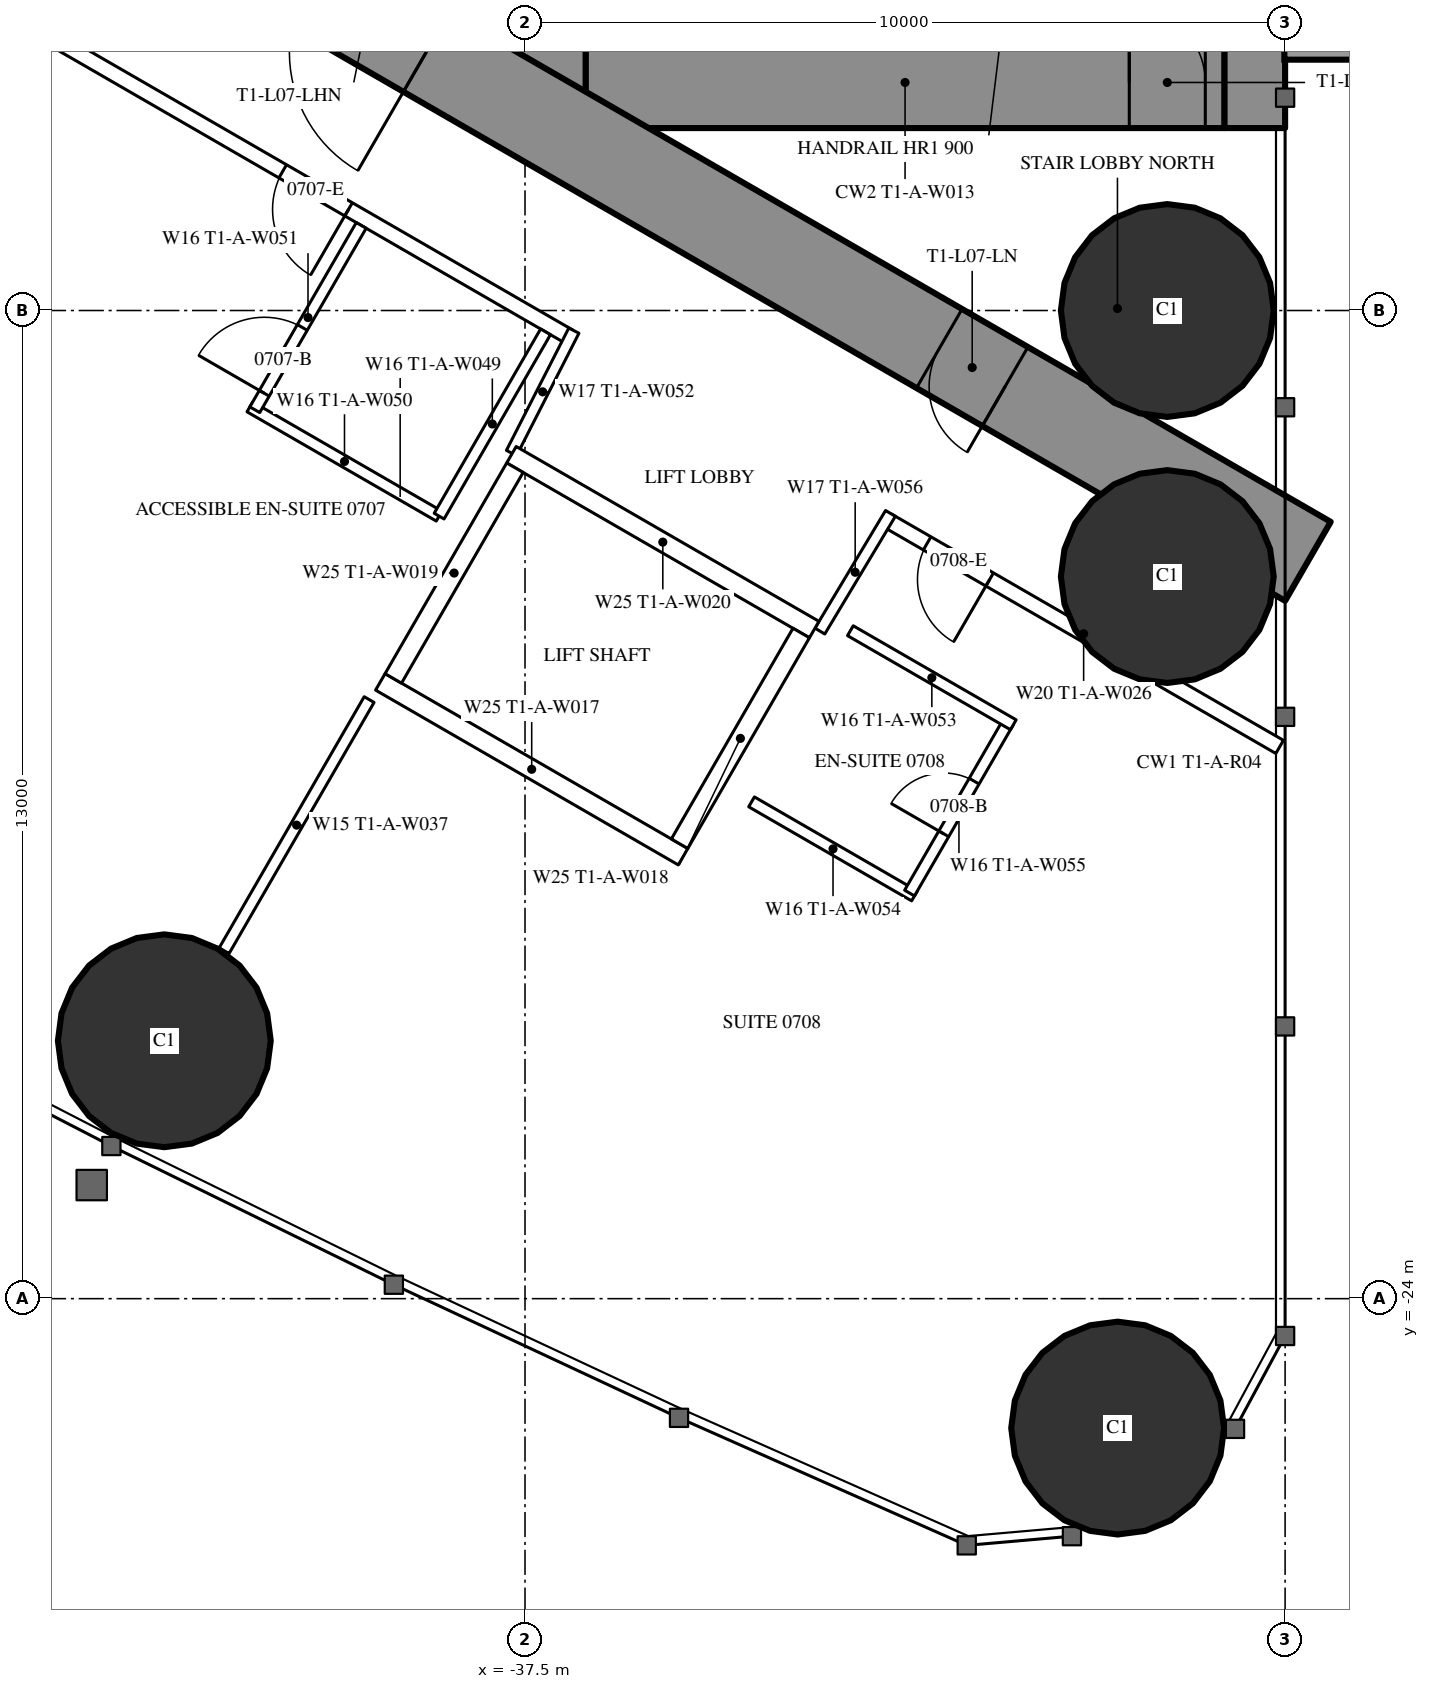
"""IFC4 building model, lengths in metres.
Left out: names, types, materials, properties, quantities, classifications, styles, units other than length and angle.
Written with IfcOpenShell. Run it as: python <this file> out.ifc"""

import sys

from ifc_helpers import new_model, si_unit, direction, frame, frame_2d, origin, origin_2d, place, context, subcontext, project, spatial, rectangle, hollow_circle, extrude, element, fill, save


model = new_model("IFC4")
c1 = context("Model", 3, precision=1e-05, world=origin(), true_north=direction((0.0, 1.0)))
c2 = subcontext(c1, "Body", "Model", "MODEL_VIEW")
j1 = project(units=[si_unit("LENGTHUNIT", "METRE"), si_unit("PLANEANGLEUNIT", "RADIAN")], contexts=[c1])
p1 = place(None, origin())
s1 = spatial("IfcSite", under=j1, at=p1, CompositionType="ELEMENT")
p2 = place(p1, origin())
s2 = spatial("IfcBuilding", under=s1, at=p2, CompositionType="ELEMENT")
p3 = place(p2, frame((0.0, 0.0, 32.0)))
s3 = spatial("IfcBuildingStorey", under=s2, at=p3, CompositionType="ELEMENT", Elevation=32.0)
for number, where, z_axis, x_axis in (
    (1, (-29.703, -25.703, 0.0), (0.0, 0.0, 1.0), (1.0, 0.0, 0.0)),
    (2, (-29.05, -11.0, 0.0), (0.0, 0.0, 1.0), (1.0, 0.0, 0.0)),
    (3, (-29.05, -14.5, 0.0), (0.0, 0.0, 1.0), (1.0, 0.0, 0.0)),
    (4, (-42.245, -20.607, 0.0), (0.0, 0.0, 1.0), (1.0, 0.0, 0.0)),
):
    element("IfcColumn", number, at=place(p3, frame(where, z_axis=z_axis, x_axis=x_axis)), inside=s3, PredefinedType="COLUMN", context=c2, shape_type="SweptSolid", body=[
        extrude(hollow_circle(Radius=1.4, WallThickness=0.12, at=origin_2d()), origin(), (0.0, 0.0, 1.0), 3.5),
    ])
p4 = place(p3, frame((-27.9, 8.6, 0.0), z_axis=(0.0, 0.0, 1.0), x_axis=(0.0, -1.0, 0.0)))
e5 = element("IfcWall", 5, at=p4, inside=s3, PredefinedType="SHEAR", context=c2, shape_type="SweptSolid", body=[
    extrude(rectangle(XDim=17.2, YDim=0.8, at=frame_2d((8.6, 0.0))), origin(), (0.0, 0.0, 1.0), 3.5),
])
p5 = place(p4, frame((2.45, 0.0, 0.6)))
e6 = element("IfcOpeningElement", 6, at=p5, cuts=e5, PredefinedType="OPENING", context=c2, shape_type="SweptSolid", body=[
    extrude(rectangle(XDim=0.6, YDim=2.1, at=frame_2d((0.3, 1.05))), frame((0.0, 0.41, 0.0), z_axis=(0.0, -1.0, 0.0), x_axis=(1.0, 0.0, 0.0)), (0.0, 0.0, 1.0), 0.82),
])
p6 = place(p4, frame((14.15, 0.0, 0.6)))
e7 = element("IfcOpeningElement", 7, at=p6, cuts=e5, PredefinedType="OPENING", context=c2, shape_type="SweptSolid", body=[
    extrude(rectangle(XDim=0.6, YDim=2.1, at=frame_2d((0.3, 1.05))), frame((0.0, 0.41, 0.0), z_axis=(0.0, -1.0, 0.0), x_axis=(1.0, 0.0, 0.0)), (0.0, 0.0, 1.0), 0.82),
])
p7 = place(p3, frame((-37.3, 8.6, 0.0), z_axis=(0.0, 0.0, 1.0), x_axis=(0.0, -1.0, 0.0)))
e8 = element("IfcWall", 8, at=p7, inside=s3, PredefinedType="SHEAR", context=c2, shape_type="SweptSolid", body=[
    extrude(rectangle(XDim=17.2, YDim=1.2, at=frame_2d((8.6, 0.0))), origin(), (0.0, 0.0, 1.0), 3.5),
])
p8 = place(p7, frame((7.7, 0.0, 0.0)))
e9 = element("IfcOpeningElement", 9, at=p8, cuts=e8, PredefinedType="OPENING", context=c2, shape_type="SweptSolid", body=[
    extrude(rectangle(XDim=1.8, YDim=2.2, at=frame_2d((0.9, 1.1))), frame((0.0, 0.61, 0.0), z_axis=(0.0, -1.0, 0.0), x_axis=(1.0, 0.0, 0.0)), (0.0, 0.0, 1.0), 1.22),
])
p9 = place(p3, frame((-28.3, -8.0, 0.0), z_axis=(0.0, 0.0, 1.0), x_axis=(-1.0, 0.0, 0.0)))
e10 = element("IfcWall", 10, at=p9, inside=s3, PredefinedType="SHEAR", context=c2, shape_type="SweptSolid", body=[
    extrude(rectangle(XDim=8.4, YDim=1.2, at=frame_2d((4.2, 0.0))), origin(), (0.0, 0.0, 1.0), 3.5),
])
p10 = place(p9, frame((0.25, 0.0, 0.0)))
e11 = element("IfcOpeningElement", 11, at=p10, cuts=e10, PredefinedType="OPENING", context=c2, shape_type="SweptSolid", body=[
    extrude(rectangle(XDim=1.0, YDim=2.2, at=frame_2d((0.5, 1.1))), frame((0.0, 0.61, 0.0), z_axis=(0.0, -1.0, 0.0), x_axis=(1.0, 0.0, 0.0)), (0.0, 0.0, 1.0), 1.22),
])
p11 = place(p3, frame((-27.2, -14.3, 0.0), z_axis=(0.0, 0.0, 1.0), x_axis=(-0.866024021859, 0.500002393557, 0.0)))
e12 = element("IfcWall", 12, at=p11, inside=s3, PredefinedType="SHEAR", context=c2, shape_type="SweptSolid", body=[
    extrude(rectangle(XDim=27.907, YDim=1.2, at=frame_2d((13.954, 0.0))), origin(), (0.0, 0.0, 1.0), 3.5),
])
p12 = place(p11, frame((4.6, 0.0, 0.0)))
e13 = element("IfcOpeningElement", 13, at=p12, cuts=e12, PredefinedType="OPENING", context=c2, shape_type="SweptSolid", body=[
    extrude(rectangle(XDim=1.0, YDim=2.2, at=frame_2d((0.5, 1.1))), frame((0.0, 0.61, 0.0), z_axis=(0.0, -1.0, 0.0), x_axis=(1.0, 0.0, 0.0)), (0.0, 0.0, 1.0), 1.22),
])
p13 = place(p11, frame((13.395, 0.0, 0.0)))
e14 = element("IfcOpeningElement", 14, at=p13, cuts=e12, PredefinedType="OPENING", context=c2, shape_type="SweptSolid", body=[
    extrude(rectangle(XDim=1.8, YDim=2.2, at=frame_2d((0.9, 1.1))), frame((0.0, 0.61, 0.0), z_axis=(0.0, -1.0, 0.0), x_axis=(1.0, 0.0, 0.0)), (0.0, 0.0, 1.0), 1.22),
])
p14 = place(p3, frame((-39.551, -16.118, 0.0), z_axis=(0.0, 0.0, 1.0), x_axis=(-0.499986503906, -0.866033195618, 0.0)))
e15 = element("IfcWall", 15, at=p14, inside=s3, PredefinedType="PARTITIONING", context=c2, shape_type="SweptSolid", body=[
    extrude(rectangle(XDim=3.815, YDim=0.15, at=frame_2d((1.907, 0.0))), origin(), (0.0, 0.0, 1.0), 3.25),
])
p15 = place(p3, frame((-27.572, -16.741, 0.0), z_axis=(0.0, 0.0, 1.0), x_axis=(-0.866024464444, 0.500001626982, 0.0)))
e16 = element("IfcWall", 16, at=p15, inside=s3, PredefinedType="PARTITIONING", context=c2, shape_type="SweptSolid", body=[
    extrude(rectangle(XDim=5.955, YDim=0.2, at=frame_2d((2.978, 0.0))), origin(), (0.0, 0.0, 1.0), 3.25),
])
p16 = place(p15, frame((4.405, 0.0, 0.0)))
e17 = element("IfcOpeningElement", 17, at=p16, cuts=e16, PredefinedType="OPENING", context=c2, shape_type="SweptSolid", body=[
    extrude(rectangle(XDim=0.95, YDim=2.2, at=frame_2d((0.475, 1.1))), frame((0.0, 0.11, 0.0), z_axis=(0.0, -1.0, 0.0), x_axis=(1.0, 0.0, 0.0)), (0.0, 0.0, 1.0), 0.22),
])
p17 = place(p3, frame((-36.92, -11.344, 0.0), z_axis=(0.0, 0.0, 1.0), x_axis=(-0.866028313256, 0.499994960614, 0.0)))
e18 = element("IfcWall", 18, at=p17, inside=s3, PredefinedType="PARTITIONING", context=c2, shape_type="SweptSolid", body=[
    extrude(rectangle(XDim=22.568, YDim=0.2, at=frame_2d((11.284, 0.0))), origin(), (0.0, 0.0, 1.0), 3.25),
])
p18 = place(p17, frame((12.68, 0.0, 0.0)))
e19 = element("IfcOpeningElement", 19, at=p18, cuts=e18, PredefinedType="OPENING", context=c2, shape_type="SweptSolid", body=[
    extrude(rectangle(XDim=0.95, YDim=2.2, at=frame_2d((0.475, 1.1))), frame((0.0, 0.11, 0.0), z_axis=(0.0, -1.0, 0.0), x_axis=(1.0, 0.0, 0.0)), (0.0, 0.0, 1.0), 0.22),
])
p19 = place(p17, frame((3.35, 0.0, 0.0)))
e20 = element("IfcOpeningElement", 20, at=p19, cuts=e18, PredefinedType="OPENING", context=c2, shape_type="SweptSolid", body=[
    extrude(rectangle(XDim=1.0, YDim=2.2, at=frame_2d((0.5, 1.1))), frame((0.0, 0.11, 0.0), z_axis=(0.0, -1.0, 0.0), x_axis=(1.0, 0.0, 0.0)), (0.0, 0.0, 1.0), 0.22),
])
p20 = place(p3, frame((-36.857, -11.265, 0.0), z_axis=(0.0, 0.0, 1.0), x_axis=(-0.454225294761, -0.890886851176, 0.0)))
e21 = element("IfcWall", 21, at=p20, inside=s3, PredefinedType="PARTITIONING", context=c2, shape_type="SweptSolid", body=[
    extrude(rectangle(XDim=1.807, YDim=0.15, at=frame_2d((0.904, 0.0))), origin(), (0.0, 0.0, 1.0), 3.25),
])
p21 = place(p3, frame((-33.621, -15.218, 0.0), z_axis=(0.0, 0.0, 1.0), x_axis=(0.514336634837, 0.857588377991, 0.0)))
e22 = element("IfcWall", 22, at=p21, inside=s3, PredefinedType="PARTITIONING", context=c2, shape_type="SweptSolid", body=[
    extrude(rectangle(XDim=1.805, YDim=0.15, at=frame_2d((0.903, 0.0))), origin(), (0.0, 0.0, 1.0), 3.25),
])
p22 = place(p3, frame((-38.63, -13.705, 0.0), z_axis=(0.0, 0.0, 1.0), x_axis=(-0.866018712932, 0.500011588718, 0.0)))
e23 = element("IfcWall", 23, at=p22, inside=s3, PredefinedType="PARTITIONING", context=c2, shape_type="SweptSolid", body=[
    extrude(rectangle(XDim=2.875, YDim=0.15, at=frame_2d((1.438, 0.0))), origin(), (0.0, 0.0, 1.0), 3.25),
])
p23 = place(p3, frame((-39.655, -9.88, 0.0), z_axis=(0.0, 0.0, 1.0), x_axis=(-0.500049511043, -0.865996816683, 0.0)))
e24 = element("IfcWall", 24, at=p23, inside=s3, PredefinedType="PARTITIONING", context=c2, shape_type="SweptSolid", body=[
    extrude(rectangle(XDim=2.8, YDim=0.15, at=frame_2d((1.4, 0.0))), origin(), (0.0, 0.0, 1.0), 3.25),
])
p24 = place(p23, frame((1.55, 0.0, 0.0)))
e25 = element("IfcOpeningElement", 25, at=p24, cuts=e24, PredefinedType="OPENING", context=c2, shape_type="SweptSolid", body=[
    extrude(rectangle(XDim=1.0, YDim=2.2, at=frame_2d((0.5, 1.1))), frame((0.0, 0.085, 0.0), z_axis=(0.0, -1.0, 0.0), x_axis=(1.0, 0.0, 0.0)), (0.0, 0.0, 1.0), 0.17),
])
p25 = place(p3, frame((-37.23, -11.281, 0.0), z_axis=(0.0, 0.0, 1.0), x_axis=(-0.500049511043, -0.865996816683, 0.0)))
e26 = element("IfcWall", 26, at=p25, inside=s3, PredefinedType="PARTITIONING", context=c2, shape_type="SweptSolid", body=[
    extrude(rectangle(XDim=2.8, YDim=0.15, at=frame_2d((1.4, 0.0))), origin(), (0.0, 0.0, 1.0), 3.25),
])
p26 = place(p3, frame((-32.376, -18.702, 0.0), z_axis=(0.0, 0.0, 1.0), x_axis=(-0.866006523861, 0.500032699561, 0.0)))
e27 = element("IfcWall", 27, at=p26, inside=s3, PredefinedType="PARTITIONING", context=c2, shape_type="SweptSolid", body=[
    extrude(rectangle(XDim=2.475, YDim=0.15, at=frame_2d((1.237, 0.0))), origin(), (0.0, 0.0, 1.0), 3.25),
])
p27 = place(p3, frame((-31.141, -16.413, 0.0), z_axis=(0.0, 0.0, 1.0), x_axis=(-0.500006934395, -0.866021400173, 0.0)))
e28 = element("IfcWall", 28, at=p27, inside=s3, PredefinedType="PARTITIONING", context=c2, shape_type="SweptSolid", body=[
    extrude(rectangle(XDim=2.6, YDim=0.15, at=frame_2d((1.3, 0.0))), origin(), (0.0, 0.0, 1.0), 3.25),
])
p28 = place(p27, frame((0.9, 0.0, 0.0)))
e29 = element("IfcOpeningElement", 29, at=p28, cuts=e28, PredefinedType="OPENING", context=c2, shape_type="SweptSolid", body=[
    extrude(rectangle(XDim=0.8, YDim=2.2, at=frame_2d((0.4, 1.1))), frame((0.0, 0.085, 0.0), z_axis=(0.0, -1.0, 0.0), x_axis=(1.0, 0.0, 0.0)), (0.0, 0.0, 1.0), 0.17),
])
p29 = place(p3, frame((-31.076, -16.45, 0.0), z_axis=(0.0, 0.0, 1.0), x_axis=(-0.866073894602, 0.499916002032, 0.0)))
e30 = element("IfcWall", 30, at=p29, inside=s3, PredefinedType="PARTITIONING", context=c2, shape_type="SweptSolid", body=[
    extrude(rectangle(XDim=2.475, YDim=0.15, at=frame_2d((1.238, 0.0))), origin(), (0.0, 0.0, 1.0), 3.25),
])
p30 = place(p3, frame((-33.696, -15.197, 0.0), z_axis=(0.0, 0.0, 1.0), x_axis=(-0.865976953817, 0.500083908417, 0.0)))
e31 = element("IfcWall", 31, at=p30, inside=s3, PredefinedType="PARTITIONING", context=c2, shape_type="SweptSolid", body=[
    extrude(rectangle(XDim=4.599, YDim=0.25, at=frame_2d((2.3, 0.0))), origin(), (0.0, 0.0, 1.0), 3.25),
])
p31 = place(p3, frame((-35.42, -18.186, 0.0), z_axis=(0.0, 0.0, 1.0), x_axis=(-0.865990227814, 0.50006092162, 0.0)))
e32 = element("IfcWall", 32, at=p31, inside=s3, PredefinedType="PARTITIONING", context=c2, shape_type="SweptSolid", body=[
    extrude(rectangle(XDim=4.6, YDim=0.25, at=frame_2d((2.3, 0.0))), origin(), (0.0, 0.0, 1.0), 3.25),
])
p32 = place(p3, frame((-33.866, -15.243, 0.0), z_axis=(0.0, 0.0, 1.0), x_axis=(-0.499929347863, -0.866066190972, 0.0)))
e33 = element("IfcWall", 33, at=p32, inside=s3, PredefinedType="PARTITIONING", context=c2, shape_type="SweptSolid", body=[
    extrude(rectangle(XDim=3.201, YDim=0.25, at=frame_2d((1.6, 0.0))), origin(), (0.0, 0.0, 1.0), 3.25),
])
p33 = place(p3, frame((-37.633, -13.068, 0.0), z_axis=(0.0, 0.0, 1.0), x_axis=(-0.499872130319, -0.866099216793, 0.0)))
e34 = element("IfcWall", 34, at=p33, inside=s3, PredefinedType="PARTITIONING", context=c2, shape_type="SweptSolid", body=[
    extrude(rectangle(XDim=3.2, YDim=0.25, at=frame_2d((1.6, 0.0))), origin(), (0.0, 0.0, 1.0), 3.25),
])
p34 = place(p24, origin())
e35 = element("IfcDoor", 35, at=p34, inside=s3, OperationType="SINGLE_SWING_RIGHT", PredefinedType="DOOR", context=c2, shape_type="SweptSolid", body=[
    extrude(rectangle(XDim=1.0, YDim=2.2, at=frame_2d((0.5, 1.1))), frame((0.0, 0.025, 0.0), z_axis=(0.0, -1.0, 0.0), x_axis=(1.0, 0.0, 0.0)), (0.0, 0.0, 1.0), 0.05),
])
fill(e25, e35)
p35 = place(p19, origin())
e36 = element("IfcDoor", 36, at=p35, inside=s3, OperationType="SINGLE_SWING_LEFT", PredefinedType="DOOR", context=c2, shape_type="SweptSolid", body=[
    extrude(rectangle(XDim=1.0, YDim=2.2, at=frame_2d((0.5, 1.1))), frame((0.0, 0.025, 0.0), z_axis=(0.0, -1.0, 0.0), x_axis=(1.0, 0.0, 0.0)), (0.0, 0.0, 1.0), 0.05),
])
fill(e20, e36)
p36 = place(p28, origin())
e37 = element("IfcDoor", 37, at=p36, inside=s3, OperationType="SINGLE_SWING_RIGHT", PredefinedType="DOOR", context=c2, shape_type="SweptSolid", body=[
    extrude(rectangle(XDim=0.8, YDim=2.2, at=frame_2d((0.4, 1.1))), frame((0.0, 0.025, 0.0), z_axis=(0.0, -1.0, 0.0), x_axis=(1.0, 0.0, 0.0)), (0.0, 0.0, 1.0), 0.05),
])
fill(e29, e37)
p37 = place(p16, origin())
e38 = element("IfcDoor", 38, at=p37, inside=s3, OperationType="SINGLE_SWING_LEFT", PredefinedType="DOOR", context=c2, shape_type="SweptSolid", body=[
    extrude(rectangle(XDim=0.95, YDim=2.2, at=frame_2d((0.475, 1.1))), frame((0.0, 0.025, 0.0), z_axis=(0.0, -1.0, 0.0), x_axis=(1.0, 0.0, 0.0)), (0.0, 0.0, 1.0), 0.05),
])
fill(e17, e38)
p38 = place(p12, origin())
e39 = element("IfcDoor", 39, at=p38, inside=s3, OperationType="SINGLE_SWING_LEFT", PredefinedType="DOOR", context=c2, shape_type="SweptSolid", body=[
    extrude(rectangle(XDim=1.0, YDim=2.2, at=frame_2d((0.5, 1.1))), frame((0.0, 0.025, 0.0), z_axis=(0.0, -1.0, 0.0), x_axis=(1.0, 0.0, 0.0)), (0.0, 0.0, 1.0), 0.05),
])
fill(e13, e39)
p39 = place(p13, origin())
e40 = element("IfcDoor", 40, at=p39, inside=s3, OperationType="DOUBLE_DOOR_SINGLE_SWING", PredefinedType="DOOR", context=c2, shape_type="SweptSolid", body=[
    extrude(rectangle(XDim=1.8, YDim=2.2, at=frame_2d((0.9, 1.1))), frame((0.0, 0.025, 0.0), z_axis=(0.0, -1.0, 0.0), x_axis=(1.0, 0.0, 0.0)), (0.0, 0.0, 1.0), 0.05),
])
fill(e14, e40)
p40 = place(p10, origin())
e41 = element("IfcDoor", 41, at=p40, inside=s3, OperationType="SINGLE_SWING_RIGHT", PredefinedType="DOOR", context=c2, shape_type="SweptSolid", body=[
    extrude(rectangle(XDim=1.0, YDim=2.2, at=frame_2d((0.5, 1.1))), frame((0.0, 0.025, 0.0), z_axis=(0.0, -1.0, 0.0), x_axis=(1.0, 0.0, 0.0)), (0.0, 0.0, 1.0), 0.05),
])
fill(e11, e41)
save(model, sys.argv[1])
